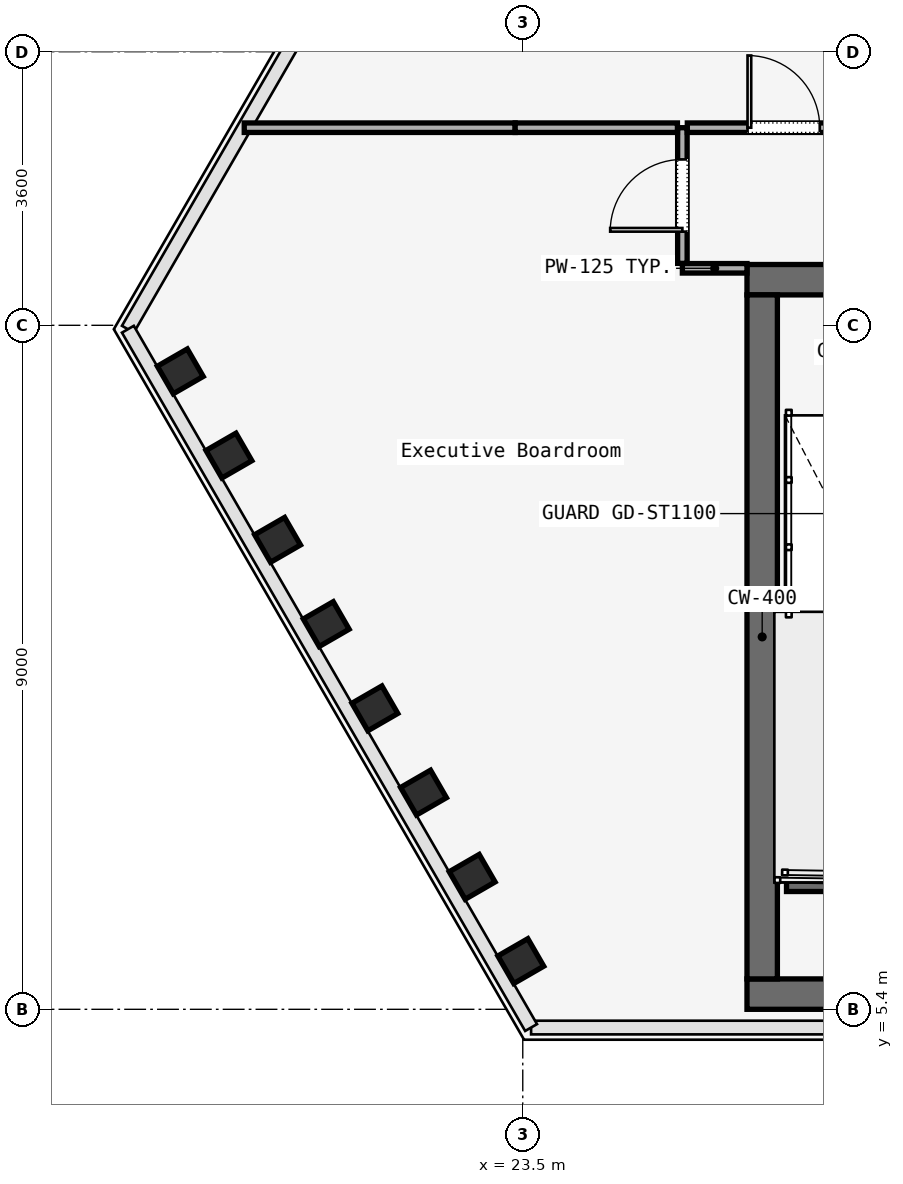
"""IFC4 building model, lengths in metres.
Left out: names, types, materials, properties, quantities, classifications, styles, units other than length and angle.
Written with IfcOpenShell. Run it as: python <this file> out.ifc"""

import sys

from ifc_helpers import new_model, si_unit, direction, frame, frame_2d, origin, origin_2d, place, context, subcontext, project, spatial, rectangle, i_section, extrude, element, fill, save


model = new_model("IFC4")
c1 = context("Model", 3, precision=1e-05, world=origin(), true_north=direction((0.0, 1.0)))
c2 = subcontext(c1, "Body", "Model", "MODEL_VIEW")
j1 = project(units=[si_unit("LENGTHUNIT", "METRE"), si_unit("PLANEANGLEUNIT", "RADIAN")], contexts=[c1])
p1 = place(None, origin())
s1 = spatial("IfcSite", under=j1, at=p1, CompositionType="ELEMENT")
p2 = place(p1, origin())
s2 = spatial("IfcBuilding", under=s1, at=p2, CompositionType="ELEMENT")
p3 = place(p2, frame((0.0, 0.0, 161.2)))
s3 = spatial("IfcBuildingStorey", under=s2, at=p3, CompositionType="ELEMENT", Elevation=161.2)
p4 = place(p3, frame((26.45, 15.0, 0.0), z_axis=(0.0, 0.0, 1.0), x_axis=(1.0, 0.0, 0.0)))
e1 = element("IfcWall", 1, at=p4, inside=s3, PredefinedType="SOLIDWALL", context=c2, shape_type="SweptSolid", body=[
    extrude(rectangle(XDim=31.1, YDim=0.4, at=frame_2d((15.55, 0.0))), origin(), (0.0, 0.0, 1.0), 3.58),
])
p5 = place(p4, frame((1.65, 0.0, 0.0)))
e2 = element("IfcOpeningElement", 2, at=p5, cuts=e1, PredefinedType="OPENING", context=c2, shape_type="SweptSolid", body=[
    extrude(rectangle(XDim=1.1, YDim=2.2, at=frame_2d((0.55, 1.1))), frame((0.0, 0.2, 0.0), z_axis=(0.0, -1.0, 0.0), x_axis=(1.0, 0.0, 0.0)), (0.0, 0.0, 1.0), 0.4),
])
p6 = place(p4, frame((13.65, 0.0, 0.0)))
e3 = element("IfcOpeningElement", 3, at=p6, cuts=e1, PredefinedType="OPENING", context=c2, shape_type="SweptSolid", body=[
    extrude(rectangle(XDim=1.1, YDim=2.2, at=frame_2d((0.55, 1.1))), frame((0.0, 0.2, 0.0), z_axis=(0.0, -1.0, 0.0), x_axis=(1.0, 0.0, 0.0)), (0.0, 0.0, 1.0), 0.4),
])
p7 = place(p4, frame((25.55, 0.0, 0.0)))
e4 = element("IfcOpeningElement", 4, at=p7, cuts=e1, PredefinedType="OPENING", context=c2, shape_type="SweptSolid", body=[
    extrude(rectangle(XDim=1.1, YDim=2.2, at=frame_2d((0.55, 1.1))), frame((0.0, 0.2, 0.0), z_axis=(0.0, -1.0, 0.0), x_axis=(1.0, 0.0, 0.0)), (0.0, 0.0, 1.0), 0.4),
])
p8 = place(p4, frame((10.7, 0.0, 0.0)))
e5 = element("IfcOpeningElement", 5, at=p8, cuts=e1, PredefinedType="OPENING", context=c2, shape_type="SweptSolid", body=[
    extrude(rectangle(XDim=1.4, YDim=2.2, at=frame_2d((0.7, 1.1))), frame((0.0, 0.2, 0.0), z_axis=(0.0, -1.0, 0.0), x_axis=(1.0, 0.0, 0.0)), (0.0, 0.0, 1.0), 0.4),
])
p9 = place(p4, frame((19.35, 0.0, 0.0)))
e6 = element("IfcOpeningElement", 6, at=p9, cuts=e1, PredefinedType="OPENING", context=c2, shape_type="SweptSolid", body=[
    extrude(rectangle(XDim=1.1, YDim=2.2, at=frame_2d((0.55, 1.1))), frame((0.0, 0.2, 0.0), z_axis=(0.0, -1.0, 0.0), x_axis=(1.0, 0.0, 0.0)), (0.0, 0.0, 1.0), 0.4),
])
p10 = place(p4, frame((21.4, 0.0, 0.0)))
e7 = element("IfcOpeningElement", 7, at=p10, cuts=e1, PredefinedType="OPENING", context=c2, shape_type="SweptSolid", body=[
    extrude(rectangle(XDim=0.9, YDim=2.1, at=frame_2d((0.45, 1.05))), frame((0.0, 0.2, 0.0), z_axis=(0.0, -1.0, 0.0), x_axis=(1.0, 0.0, 0.0)), (0.0, 0.0, 1.0), 0.4),
])
p11 = place(p4, frame((23.35, 0.0, 0.0)))
e8 = element("IfcOpeningElement", 8, at=p11, cuts=e1, PredefinedType="OPENING", context=c2, shape_type="SweptSolid", body=[
    extrude(rectangle(XDim=1.3, YDim=2.3, at=frame_2d((0.65, 1.15))), frame((0.0, 0.2, 0.0), z_axis=(0.0, -1.0, 0.0), x_axis=(1.0, 0.0, 0.0)), (0.0, 0.0, 1.0), 0.4),
])
p12 = place(p3, frame((26.45, 5.6, 0.0), z_axis=(0.0, 0.0, 1.0), x_axis=(1.0, 0.0, 0.0)))
e9 = element("IfcWall", 9, at=p12, inside=s3, PredefinedType="SOLIDWALL", context=c2, shape_type="SweptSolid", body=[
    extrude(rectangle(XDim=31.1, YDim=0.4, at=frame_2d((15.55, 0.0))), origin(), (0.0, 0.0, 1.0), 3.58),
])
p13 = place(p3, frame((26.65, 5.8, 0.0), z_axis=(0.0, 0.0, 1.0), x_axis=(0.0, 1.0, 0.0)))
e10 = element("IfcWall", 10, at=p13, inside=s3, PredefinedType="SOLIDWALL", context=c2, shape_type="SweptSolid", body=[
    extrude(rectangle(XDim=9.0, YDim=0.4, at=frame_2d((4.5, 0.0))), origin(), (0.0, 0.0, 1.0), 3.58),
])
for number, where, z_axis, x_axis in (
    (11, (18.994, 13.794, 0.0), (0.0, 0.0, 1.0), (-0.5, 0.866, 0.0)),
    (12, (19.634, 12.686, 0.0), (0.0, 0.0, 1.0), (-0.5, 0.866, 0.0)),
    (13, (20.274, 11.577, 0.0), (0.0, 0.0, 1.0), (-0.5, 0.866, 0.0)),
    (14, (20.914, 10.469, 0.0), (0.0, 0.0, 1.0), (-0.5, 0.866, 0.0)),
    (15, (21.554, 9.36, 0.0), (0.0, 0.0, 1.0), (-0.5, 0.866, 0.0)),
    (16, (22.194, 8.251, 0.0), (0.0, 0.0, 1.0), (-0.5, 0.866, 0.0)),
    (17, (22.834, 7.143, 0.0), (0.0, 0.0, 1.0), (-0.5, 0.866, 0.0)),
    (18, (23.474, 6.034, 0.0), (0.0, 0.0, 1.0), (-0.5, 0.866, 0.0)),
):
    element("IfcColumn", number, at=place(p3, frame(where, z_axis=z_axis, x_axis=x_axis)), inside=s3, PredefinedType="COLUMN", context=c2, shape_type="SweptSolid", body=[
        extrude(i_section(OverallWidth=0.418, OverallDepth=0.455, WebThickness=0.042, FlangeThickness=0.052, FilletRadius=0.015, at=origin_2d()), origin(), (0.0, 0.0, 1.0), 3.58),
    ])
p14 = place(p3, frame((26.97, 7.05, 0.0), z_axis=(0.0, 0.0, 1.0), x_axis=(1.0, 0.0, 0.0)))
e19 = element("IfcWall", 19, at=p14, inside=s3, PredefinedType="SOLIDWALL", context=c2, shape_type="SweptSolid", body=[
    extrude(rectangle(XDim=3.115, YDim=0.2, at=frame_2d((1.558, 0.0))), origin(), (0.0, 0.0, 1.0), 3.8),
])
p15 = place(p3, frame((26.45, 15.15, 0.0), z_axis=(0.0, 0.0, 1.0), x_axis=(-1.0, 0.0, 0.0)))
e20 = element("IfcWall", 20, at=p15, inside=s3, PredefinedType="PARTITIONING", context=c2, shape_type="SweptSolid", body=[
    extrude(rectangle(XDim=0.85, YDim=0.125, at=frame_2d((0.425, 0.0))), origin(), (0.0, 0.0, 1.0), 3.01),
])
p16 = place(p3, frame((25.6, 15.215, 0.0), z_axis=(0.0, 0.0, 1.0), x_axis=(0.0, 1.0, 0.0)))
e21 = element("IfcWall", 21, at=p16, inside=s3, PredefinedType="PARTITIONING", context=c2, shape_type="SweptSolid", body=[
    extrude(rectangle(XDim=1.785, YDim=0.125, at=frame_2d((0.893, 0.0))), origin(), (0.0, 0.0, 1.0), 3.01),
])
p17 = place(p16, frame((0.417, 0.0, 0.0)))
e22 = element("IfcOpeningElement", 22, at=p17, cuts=e21, PredefinedType="OPENING", context=c2, shape_type="SweptSolid", body=[
    extrude(rectangle(XDim=0.95, YDim=2.2, at=frame_2d((0.475, 1.1))), frame((0.0, 0.062, 0.0), z_axis=(0.0, -1.0, 0.0), x_axis=(1.0, 0.0, 0.0)), (0.0, 0.0, 1.0), 0.125),
])
p18 = place(p3, frame((25.665, 17.0, 0.0), z_axis=(0.0, 0.0, 1.0), x_axis=(1.0, 0.0, 0.0)))
e23 = element("IfcWall", 23, at=p18, inside=s3, PredefinedType="PARTITIONING", context=c2, shape_type="SweptSolid", body=[
    extrude(rectangle(XDim=2.535, YDim=0.125, at=frame_2d((1.268, 0.0))), origin(), (0.0, 0.0, 1.0), 3.01),
])
p19 = place(p18, frame((0.792, 0.0, 0.0)))
e24 = element("IfcOpeningElement", 24, at=p19, cuts=e23, PredefinedType="OPENING", context=c2, shape_type="SweptSolid", body=[
    extrude(rectangle(XDim=0.95, YDim=2.2, at=frame_2d((0.475, 1.1))), frame((0.0, 0.062, 0.0), z_axis=(0.0, -1.0, 0.0), x_axis=(1.0, 0.0, 0.0)), (0.0, 0.0, 1.0), 0.125),
])
p20 = place(p3, frame((19.835, 17.0, 0.0), z_axis=(0.0, 0.0, 1.0), x_axis=(1.0, 0.0, 0.0)))
e25 = element("IfcWall", 25, at=p20, inside=s3, PredefinedType="PARTITIONING", context=c2, shape_type="SweptSolid", body=[
    extrude(rectangle(XDim=3.564, YDim=0.125, at=frame_2d((1.782, 0.0))), origin(), (0.0, 0.0, 1.0), 3.01),
])
p21 = place(p3, frame((23.4, 17.0, 0.0), z_axis=(0.0, 0.0, 1.0), x_axis=(1.0, 0.0, 0.0)))
e26 = element("IfcWall", 26, at=p21, inside=s3, PredefinedType="PARTITIONING", context=c2, shape_type="SweptSolid", body=[
    extrude(rectangle(XDim=2.135, YDim=0.125, at=frame_2d((1.067, 0.0))), origin(), (0.0, 0.0, 1.0), 3.01),
])
p22 = place(p17, origin())
e27 = element("IfcDoor", 27, at=p22, inside=s3, OperationType="SINGLE_SWING_LEFT", PredefinedType="DOOR", context=c2, shape_type="SweptSolid", body=[
    extrude(rectangle(XDim=0.95, YDim=2.2, at=frame_2d((0.475, 1.1))), frame((0.0, 0.025, 0.0), z_axis=(0.0, -1.0, 0.0), x_axis=(1.0, 0.0, 0.0)), (0.0, 0.0, 1.0), 0.05),
])
fill(e22, e27)
p23 = place(p19, origin())
e28 = element("IfcDoor", 28, at=p23, inside=s3, OperationType="SINGLE_SWING_RIGHT", PredefinedType="DOOR", context=c2, shape_type="SweptSolid", body=[
    extrude(rectangle(XDim=0.95, YDim=2.2, at=frame_2d((0.475, 1.1))), frame((0.0, 0.025, 0.0), z_axis=(0.0, -1.0, 0.0), x_axis=(1.0, 0.0, 0.0)), (0.0, 0.0, 1.0), 0.05),
])
fill(e24, e28)
save(model, sys.argv[1])
